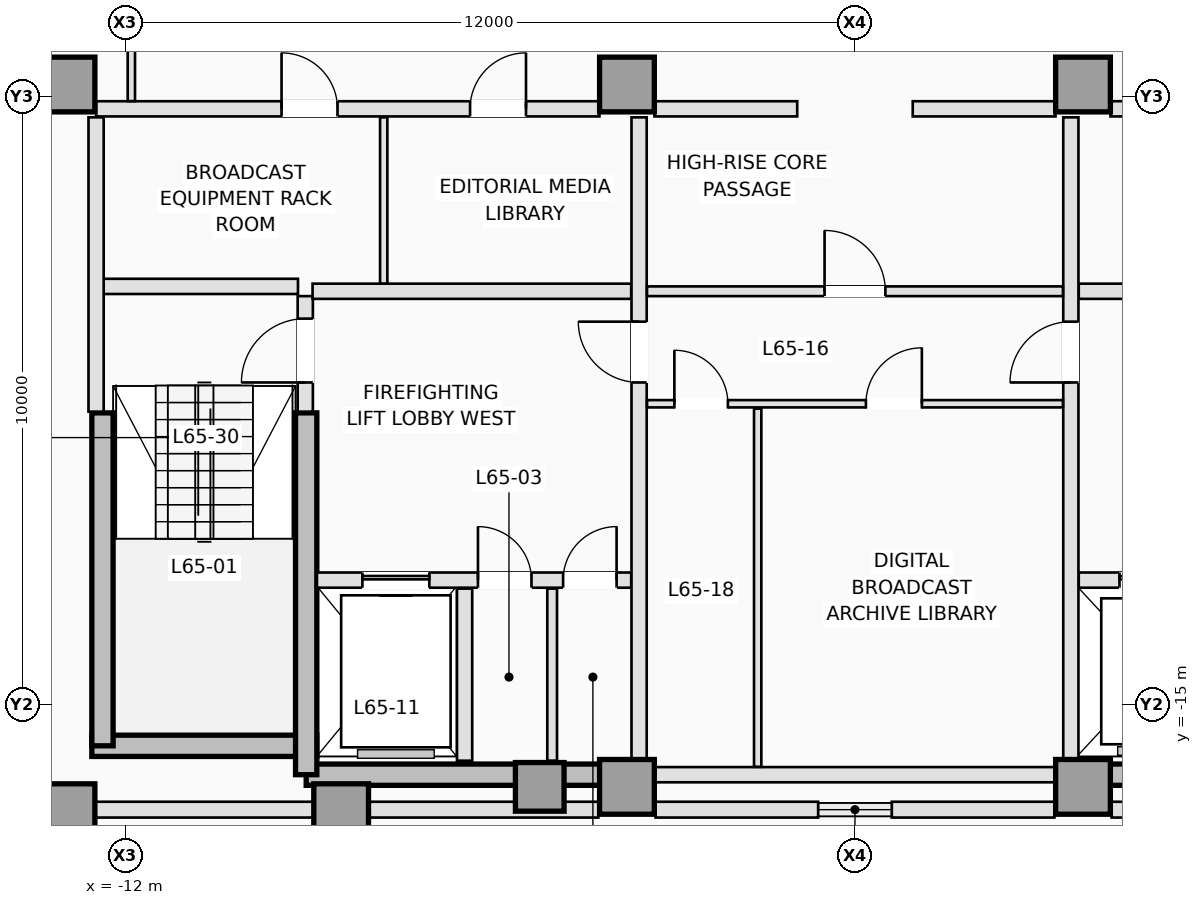
"""IFC4 building model, lengths in metres.
Left out: names, types, materials, properties, quantities, classifications, styles, units other than length and angle.
Written with IfcOpenShell. Run it as: python <this file> out.ifc"""

import sys

from ifc_helpers import new_model, si_unit, direction, frame, frame_2d, origin, origin_2d, place, context, subcontext, project, spatial, rectangle, extrude, element, fill, save


model = new_model("IFC4")
c1 = context("Model", 3, precision=1e-05, world=origin(), true_north=direction((0.0, 1.0)))
c2 = subcontext(c1, "Body", "Model", "MODEL_VIEW")
j1 = project(units=[si_unit("LENGTHUNIT", "METRE"), si_unit("PLANEANGLEUNIT", "RADIAN")], contexts=[c1])
p1 = place(None, origin())
s1 = spatial("IfcSite", under=j1, at=p1, CompositionType="ELEMENT")
p2 = place(p1, origin())
s2 = spatial("IfcBuilding", under=s1, at=p2, CompositionType="ELEMENT")
p3 = place(p2, frame((0.0, 0.0, 235.9)))
s3 = spatial("IfcBuildingStorey", under=s2, at=p3, CompositionType="ELEMENT", Elevation=235.9)
p4 = place(p3, frame((-12.55, -15.675, 0.0), z_axis=(0.0, 0.0, 1.0), x_axis=(1.0, 0.0, 0.0)))
e1 = element("IfcWall", 1, at=p4, inside=s3, PredefinedType="SHEAR", context=c2, shape_type="SweptSolid", body=[
    extrude(rectangle(XDim=3.7, YDim=0.35, at=frame_2d((1.85, 0.0))), origin(), (0.0, 0.0, 1.0), 3.5),
])
for number, where, z_axis, x_axis in (
    (2, (-9.025, -16.15, 0.0), (0.0, 0.0, 1.0), (1.0, 0.0, 0.0)),
    (3, (3.75, -16.15, 0.0), (0.0, 0.0, 1.0), (1.0, 0.0, 0.0)),
):
    element("IfcWall", number, at=place(p3, frame(where, z_axis=z_axis, x_axis=x_axis)), inside=s3, PredefinedType="SHEAR", context=c2, shape_type="SweptSolid", body=[
        extrude(rectangle(XDim=5.275, YDim=0.35, at=frame_2d((2.637, 0.0))), origin(), (0.0, 0.0, 1.0), 3.5),
    ])
p5 = place(p3, frame((-12.375, -15.675, 0.0), z_axis=(0.0, 0.0, 1.0), x_axis=(0.0, 1.0, 0.0)))
e4 = element("IfcWall", 4, at=p5, inside=s3, PredefinedType="SHEAR", context=c2, shape_type="SweptSolid", body=[
    extrude(rectangle(XDim=5.475, YDim=0.35, at=frame_2d((2.738, 0.0))), origin(), (0.0, 0.0, 1.0), 3.5),
])
p6 = place(p3, frame((-9.025, -16.15, 0.0), z_axis=(0.0, 0.0, 1.0), x_axis=(0.0, 1.0, 0.0)))
e5 = element("IfcWall", 5, at=p6, inside=s3, PredefinedType="SHEAR", context=c2, shape_type="SweptSolid", body=[
    extrude(rectangle(XDim=5.95, YDim=0.35, at=frame_2d((2.975, 0.0))), origin(), (0.0, 0.0, 1.0), 3.5),
])
for number, where, z_axis, x_axis in (
    (6, (-12.95, -16.75, 0.0), (0.0, 0.0, 1.0), (1.0, 0.0, 0.0)),
    (7, (-8.45, -16.75, 0.0), (0.0, 0.0, 1.0), (1.0, 0.0, 0.0)),
    (8, (-3.75, -16.35, 0.0), (0.0, 0.0, 1.0), (1.0, 0.0, 0.0)),
    (9, (3.75, -16.35, 0.0), (0.0, 0.0, 1.0), (1.0, 0.0, 0.0)),
    (10, (-12.95, -4.8, 0.0), (0.0, 0.0, 1.0), (1.0, 0.0, 0.0)),
    (11, (-3.75, -4.8, 0.0), (0.0, 0.0, 1.0), (1.0, 0.0, 0.0)),
    (12, (3.75, -4.8, 0.0), (0.0, 0.0, 1.0), (1.0, 0.0, 0.0)),
):
    element("IfcColumn", number, at=place(p3, frame(where, z_axis=z_axis, x_axis=x_axis)), inside=s3, PredefinedType="COLUMN", context=c2, shape_type="SweptSolid", body=[
        extrude(rectangle(XDim=0.9, YDim=0.9, at=origin_2d()), origin(), (0.0, 0.0, 1.0), 3.5),
    ])
p7 = place(p3, frame((-5.184, -16.35, 0.0), z_axis=(0.0, 0.0, 1.0), x_axis=(0.0, 1.0, 0.0)))
e13 = element("IfcColumn", 13, at=p7, inside=s3, PredefinedType="COLUMN", context=c2, shape_type="SweptSolid", body=[
    extrude(rectangle(XDim=0.8, YDim=0.8, at=origin_2d()), origin(), (0.0, 0.0, 1.0), 3.5),
])
for number, where, z_axis, x_axis in (
    (14, (15.493, -16.725, 0.0), (0.0, 0.0, 1.0), (-1.0, 0.0, 0.0)),
    (15, (-4.22, -16.725, 0.0), (0.0, 0.0, 1.0), (-1.0, 0.0, 0.0)),
):
    element("IfcWall", number, at=place(p3, frame(where, z_axis=z_axis, x_axis=x_axis)), inside=s3, PredefinedType="STANDARD", context=c2, shape_type="SweptSolid", body=[
        extrude(rectangle(XDim=11.273, YDim=0.26, at=frame_2d((5.636, 0.0))), origin(), (0.0, 0.0, 1.0), 2.79),
    ])
for number, where, z_axis, x_axis in (
    (16, (3.28, -16.725, 0.0), (0.0, 0.0, 1.0), (-1.0, 0.0, 0.0)),
    (17, (-0.606, -16.725, 0.0), (0.0, 0.0, 1.0), (-1.0, 0.0, 0.0)),
):
    element("IfcWall", number, at=place(p3, frame(where, z_axis=z_axis, x_axis=x_axis)), inside=s3, PredefinedType="STANDARD", context=c2, shape_type="SweptSolid", body=[
        extrude(rectangle(XDim=2.674, YDim=0.26, at=frame_2d((1.337, 0.0))), origin(), (0.0, 0.0, 1.0), 3.25),
    ])
p8 = place(p3, frame((-9.04, -10.18, 0.0), z_axis=(0.0, 0.0, 1.0), x_axis=(0.0, 1.0, 0.0)))
e18 = element("IfcWall", 18, at=p8, inside=s3, PredefinedType="PARTITIONING", context=c2, shape_type="SweptSolid", body=[
    extrude(rectangle(XDim=1.9, YDim=0.25, at=frame_2d((0.95, 0.0))), origin(), (0.0, 0.0, 1.0), 3.25),
])
p9 = place(p8, frame((0.48, 0.0, 0.0)))
e19 = element("IfcOpeningElement", 19, at=p9, cuts=e18, PredefinedType="OPENING", context=c2, shape_type="SweptSolid", body=[
    extrude(rectangle(XDim=1.05, YDim=2.15, at=frame_2d((0.525, 1.075))), frame((0.0, 0.135, 0.0), z_axis=(0.0, -1.0, 0.0), x_axis=(1.0, 0.0, 0.0)), (0.0, 0.0, 1.0), 0.27),
])
p10 = place(p3, frame((-12.38, -8.12, 0.0), z_axis=(0.0, 0.0, 1.0), x_axis=(1.0, 0.0, 0.0)))
e20 = element("IfcWall", 20, at=p10, inside=s3, PredefinedType="PARTITIONING", context=c2, shape_type="SweptSolid", body=[
    extrude(rectangle(XDim=3.22, YDim=0.25, at=frame_2d((1.61, 0.0))), origin(), (0.0, 0.0, 1.0), 3.25),
])
p11 = place(p3, frame((-12.48, -10.18, 0.0), z_axis=(0.0, 0.0, 1.0), x_axis=(0.0, 1.0, 0.0)))
e21 = element("IfcWall", 21, at=p11, inside=s3, PredefinedType="PARTITIONING", context=c2, shape_type="SweptSolid", body=[
    extrude(rectangle(XDim=4.84, YDim=0.25, at=frame_2d((2.42, 0.0))), origin(), (0.0, 0.0, 1.0), 3.25),
])
p12 = place(p3, frame((-8.848, -12.95, 0.0), z_axis=(0.0, 0.0, 1.0), x_axis=(1.0, 0.0, 0.0)))
e22 = element("IfcWall", 22, at=p12, inside=s3, PredefinedType="PARTITIONING", context=c2, shape_type="SweptSolid", body=[
    extrude(rectangle(XDim=5.168, YDim=0.25, at=frame_2d((2.584, 0.0))), origin(), (0.0, 0.0, 1.0), 3.25),
])
p13 = place(p12, frame((0.748, 0.0, 0.0)))
e23 = element("IfcOpeningElement", 23, at=p13, cuts=e22, PredefinedType="OPENING", context=c2, shape_type="SweptSolid", body=[
    extrude(rectangle(XDim=1.1, YDim=2.15, at=frame_2d((0.55, 1.075))), frame((0.0, 0.135, 0.0), z_axis=(0.0, -1.0, 0.0), x_axis=(1.0, 0.0, 0.0)), (0.0, 0.0, 1.0), 0.27),
])
p14 = place(p12, frame((2.648, 0.0, 0.0)))
e24 = element("IfcOpeningElement", 24, at=p14, cuts=e22, PredefinedType="OPENING", context=c2, shape_type="SweptSolid", body=[
    extrude(rectangle(XDim=0.88, YDim=2.1, at=frame_2d((0.44, 1.05))), frame((0.0, 0.135, 0.0), z_axis=(0.0, -1.0, 0.0), x_axis=(1.0, 0.0, 0.0)), (0.0, 0.0, 1.0), 0.27),
])
p15 = place(p12, frame((4.048, 0.0, 0.0)))
e25 = element("IfcOpeningElement", 25, at=p15, cuts=e22, PredefinedType="OPENING", context=c2, shape_type="SweptSolid", body=[
    extrude(rectangle(XDim=0.88, YDim=2.1, at=frame_2d((0.44, 1.05))), frame((0.0, 0.135, 0.0), z_axis=(0.0, -1.0, 0.0), x_axis=(1.0, 0.0, 0.0)), (0.0, 0.0, 1.0), 0.27),
])
p16 = place(p3, frame((3.68, -12.95, 0.0), z_axis=(0.0, 0.0, 1.0), x_axis=(1.0, 0.0, 0.0)))
e26 = element("IfcWall", 26, at=p16, inside=s3, PredefinedType="PARTITIONING", context=c2, shape_type="SweptSolid", body=[
    extrude(rectangle(XDim=5.168, YDim=0.25, at=frame_2d((2.584, 0.0))), origin(), (0.0, 0.0, 1.0), 3.25),
])
p17 = place(p16, frame((3.32, 0.0, 0.0)))
e27 = element("IfcOpeningElement", 27, at=p17, cuts=e26, PredefinedType="OPENING", context=c2, shape_type="SweptSolid", body=[
    extrude(rectangle(XDim=1.1, YDim=2.15, at=frame_2d((0.55, 1.075))), frame((0.0, 0.135, 0.0), z_axis=(0.0, -1.0, 0.0), x_axis=(1.0, 0.0, 0.0)), (0.0, 0.0, 1.0), 0.27),
])
p18 = place(p16, frame((0.67, 0.0, 0.0)))
e28 = element("IfcOpeningElement", 28, at=p18, cuts=e26, PredefinedType="OPENING", context=c2, shape_type="SweptSolid", body=[
    extrude(rectangle(XDim=1.2, YDim=2.15, at=frame_2d((0.6, 1.075))), frame((0.0, 0.135, 0.0), z_axis=(0.0, -1.0, 0.0), x_axis=(1.0, 0.0, 0.0)), (0.0, 0.0, 1.0), 0.27),
])
p19 = place(p3, frame((-6.42, -15.92, 0.0), z_axis=(0.0, 0.0, 1.0), x_axis=(0.0, 1.0, 0.0)))
e29 = element("IfcWall", 29, at=p19, inside=s3, PredefinedType="PARTITIONING", context=c2, shape_type="SweptSolid", body=[
    extrude(rectangle(XDim=2.83, YDim=0.25, at=frame_2d((1.415, 0.0))), origin(), (0.0, 0.0, 1.0), 3.25),
])
p20 = place(p3, frame((-4.98, -15.92, 0.0), z_axis=(0.0, 0.0, 1.0), x_axis=(0.0, 1.0, 0.0)))
e30 = element("IfcWall", 30, at=p20, inside=s3, PredefinedType="PARTITIONING", context=c2, shape_type="SweptSolid", body=[
    extrude(rectangle(XDim=2.83, YDim=0.16, at=frame_2d((1.415, 0.0))), origin(), (0.0, 0.0, 1.0), 3.25),
])
for number, where, z_axis, x_axis in (
    (31, (-8.92, -8.2, 0.0), (0.0, 0.0, 1.0), (1.0, 0.0, 0.0)),
    (32, (3.68, -8.2, 0.0), (0.0, 0.0, 1.0), (1.0, 0.0, 0.0)),
):
    element("IfcWall", number, at=place(p3, frame(where, z_axis=z_axis, x_axis=x_axis)), inside=s3, PredefinedType="PARTITIONING", context=c2, shape_type="SweptSolid", body=[
        extrude(rectangle(XDim=5.24, YDim=0.25, at=frame_2d((2.62, 0.0))), origin(), (0.0, 0.0, 1.0), 3.25),
    ])
p21 = place(p3, frame((-3.55, -15.898, 0.0), z_axis=(0.0, 0.0, 1.0), x_axis=(0.0, 1.0, 0.0)))
e33 = element("IfcWall", 33, at=p21, inside=s3, PredefinedType="PARTITIONING", context=c2, shape_type="SweptSolid", body=[
    extrude(rectangle(XDim=10.558, YDim=0.25, at=frame_2d((5.279, 0.0))), origin(), (0.0, 0.0, 1.0), 3.25),
])
p22 = place(p21, frame((6.198, 0.0, 0.0)))
e34 = element("IfcOpeningElement", 34, at=p22, cuts=e33, PredefinedType="OPENING", context=c2, shape_type="SweptSolid", body=[
    extrude(rectangle(XDim=1.0, YDim=2.15, at=frame_2d((0.5, 1.075))), frame((0.0, 0.135, 0.0), z_axis=(0.0, -1.0, 0.0), x_axis=(1.0, 0.0, 0.0)), (0.0, 0.0, 1.0), 0.27),
])
p23 = place(p3, frame((3.55, -15.898, 0.0), z_axis=(0.0, 0.0, 1.0), x_axis=(0.0, 1.0, 0.0)))
e35 = element("IfcWall", 35, at=p23, inside=s3, PredefinedType="PARTITIONING", context=c2, shape_type="SweptSolid", body=[
    extrude(rectangle(XDim=10.558, YDim=0.25, at=frame_2d((5.279, 0.0))), origin(), (0.0, 0.0, 1.0), 3.25),
])
p24 = place(p23, frame((6.198, 0.0, 0.0)))
e36 = element("IfcOpeningElement", 36, at=p24, cuts=e35, PredefinedType="OPENING", context=c2, shape_type="SweptSolid", body=[
    extrude(rectangle(XDim=1.0, YDim=2.15, at=frame_2d((0.5, 1.075))), frame((0.0, 0.135, 0.0), z_axis=(0.0, -1.0, 0.0), x_axis=(1.0, 0.0, 0.0)), (0.0, 0.0, 1.0), 0.27),
])
p25 = place(p3, frame((-12.48, -5.2, 0.0), z_axis=(0.0, 0.0, 1.0), x_axis=(1.0, 0.0, 0.0)))
e37 = element("IfcWall", 37, at=p25, inside=s3, PredefinedType="PARTITIONING", context=c2, shape_type="SweptSolid", body=[
    extrude(rectangle(XDim=8.278, YDim=0.25, at=frame_2d((4.139, 0.0))), origin(), (0.0, 0.0, 1.0), 3.25),
])
p26 = place(p25, frame((3.05, 0.0, 0.0)))
e38 = element("IfcOpeningElement", 38, at=p26, cuts=e37, PredefinedType="OPENING", context=c2, shape_type="SweptSolid", body=[
    extrude(rectangle(XDim=0.92, YDim=2.12, at=frame_2d((0.46, 1.06))), frame((0.0, 0.135, 0.0), z_axis=(0.0, -1.0, 0.0), x_axis=(1.0, 0.0, 0.0)), (0.0, 0.0, 1.0), 0.27),
])
p27 = place(p25, frame((6.15, 0.0, 0.0)))
e39 = element("IfcOpeningElement", 39, at=p27, cuts=e37, PredefinedType="OPENING", context=c2, shape_type="SweptSolid", body=[
    extrude(rectangle(XDim=0.92, YDim=2.12, at=frame_2d((0.46, 1.06))), frame((0.0, 0.135, 0.0), z_axis=(0.0, -1.0, 0.0), x_axis=(1.0, 0.0, 0.0)), (0.0, 0.0, 1.0), 0.27),
])
p28 = place(p3, frame((4.202, -5.2, 0.0), z_axis=(0.0, 0.0, 1.0), x_axis=(1.0, 0.0, 0.0)))
e40 = element("IfcWall", 40, at=p28, inside=s3, PredefinedType="PARTITIONING", context=c2, shape_type="SweptSolid", body=[
    extrude(rectangle(XDim=8.278, YDim=0.25, at=frame_2d((4.139, 0.0))), origin(), (0.0, 0.0, 1.0), 3.25),
])
p29 = place(p28, frame((0.748, 0.0, 0.0)))
e41 = element("IfcOpeningElement", 41, at=p29, cuts=e40, PredefinedType="OPENING", context=c2, shape_type="SweptSolid", body=[
    extrude(rectangle(XDim=1.0, YDim=2.15, at=frame_2d((0.5, 1.075))), frame((0.0, 0.135, 0.0), z_axis=(0.0, -1.0, 0.0), x_axis=(1.0, 0.0, 0.0)), (0.0, 0.0, 1.0), 0.27),
])
p30 = place(p28, frame((2.698, 0.0, 0.0)))
e42 = element("IfcOpeningElement", 42, at=p30, cuts=e40, PredefinedType="OPENING", context=c2, shape_type="SweptSolid", body=[
    extrude(rectangle(XDim=1.0, YDim=2.15, at=frame_2d((0.5, 1.075))), frame((0.0, 0.135, 0.0), z_axis=(0.0, -1.0, 0.0), x_axis=(1.0, 0.0, 0.0)), (0.0, 0.0, 1.0), 0.27),
])
p31 = place(p28, frame((4.648, 0.0, 0.0)))
e43 = element("IfcOpeningElement", 43, at=p31, cuts=e40, PredefinedType="OPENING", context=c2, shape_type="SweptSolid", body=[
    extrude(rectangle(XDim=1.0, YDim=2.15, at=frame_2d((0.5, 1.075))), frame((0.0, 0.135, 0.0), z_axis=(0.0, -1.0, 0.0), x_axis=(1.0, 0.0, 0.0)), (0.0, 0.0, 1.0), 0.27),
])
p32 = place(p28, frame((6.598, 0.0, 0.0)))
e44 = element("IfcOpeningElement", 44, at=p32, cuts=e40, PredefinedType="OPENING", context=c2, shape_type="SweptSolid", body=[
    extrude(rectangle(XDim=1.0, YDim=2.15, at=frame_2d((0.5, 1.075))), frame((0.0, 0.135, 0.0), z_axis=(0.0, -1.0, 0.0), x_axis=(1.0, 0.0, 0.0)), (0.0, 0.0, 1.0), 0.27),
])
for number, where, z_axis, x_axis in (
    (45, (-3.298, -5.2, 0.0), (0.0, 0.0, 1.0), (1.0, 0.0, 0.0)),
    (46, (0.95, -5.2, 0.0), (0.0, 0.0, 1.0), (1.0, 0.0, 0.0)),
):
    element("IfcWall", number, at=place(p3, frame(where, z_axis=z_axis, x_axis=x_axis)), inside=s3, PredefinedType="PARTITIONING", context=c2, shape_type="SweptSolid", body=[
        extrude(rectangle(XDim=2.348, YDim=0.25, at=frame_2d((1.174, 0.0))), origin(), (0.0, 0.0, 1.0), 3.25),
    ])
p33 = place(p3, frame((-7.75, -8.073, 0.0), z_axis=(0.0, 0.0, 1.0), x_axis=(0.0, 1.0, 0.0)))
e47 = element("IfcWall", 47, at=p33, inside=s3, PredefinedType="PARTITIONING", context=c2, shape_type="SweptSolid", body=[
    extrude(rectangle(XDim=2.733, YDim=0.12, at=frame_2d((1.366, 0.0))), origin(), (0.0, 0.0, 1.0), 3.25),
])
p34 = place(p3, frame((-3.298, -16.15, 0.0), z_axis=(0.0, 0.0, 1.0), x_axis=(1.0, 0.0, 0.0)))
e48 = element("IfcWall", 48, at=p34, inside=s3, PredefinedType="PARTITIONING", context=c2, shape_type="SweptSolid", body=[
    extrude(rectangle(XDim=6.596, YDim=0.25, at=frame_2d((3.298, 0.0))), origin(), (0.0, 0.0, 1.0), 2.844),
])
p35 = place(p3, frame((-3.42, -8.2, 0.0), z_axis=(0.0, 0.0, 1.0), x_axis=(1.0, 0.0, 0.0)))
e49 = element("IfcWall", 49, at=p35, inside=s3, PredefinedType="PARTITIONING", context=c2, shape_type="SweptSolid", body=[
    extrude(rectangle(XDim=6.84, YDim=0.16, at=frame_2d((3.42, 0.0))), origin(), (0.0, 0.0, 1.0), 3.25),
])
p36 = place(p35, frame((2.92, 0.0, 0.0)))
e50 = element("IfcOpeningElement", 50, at=p36, cuts=e49, PredefinedType="OPENING", context=c2, shape_type="SweptSolid", body=[
    extrude(rectangle(XDim=1.0, YDim=2.15, at=frame_2d((0.5, 1.075))), frame((0.0, 0.09, 0.0), z_axis=(0.0, -1.0, 0.0), x_axis=(1.0, 0.0, 0.0)), (0.0, 0.0, 1.0), 0.18),
])
p37 = place(p3, frame((-3.42, -10.05, 0.0), z_axis=(0.0, 0.0, 1.0), x_axis=(1.0, 0.0, 0.0)))
e51 = element("IfcWall", 51, at=p37, inside=s3, PredefinedType="PARTITIONING", context=c2, shape_type="SweptSolid", body=[
    extrude(rectangle(XDim=6.84, YDim=0.12, at=frame_2d((3.42, 0.0))), origin(), (0.0, 0.0, 1.0), 3.25),
])
p38 = place(p37, frame((0.45, 0.0, 0.0)))
e52 = element("IfcOpeningElement", 52, at=p38, cuts=e51, PredefinedType="OPENING", context=c2, shape_type="SweptSolid", body=[
    extrude(rectangle(XDim=0.88, YDim=2.12, at=frame_2d((0.44, 1.06))), frame((0.0, 0.07, 0.0), z_axis=(0.0, -1.0, 0.0), x_axis=(1.0, 0.0, 0.0)), (0.0, 0.0, 1.0), 0.14),
])
p39 = place(p37, frame((3.6, 0.0, 0.0)))
e53 = element("IfcOpeningElement", 53, at=p39, cuts=e51, PredefinedType="OPENING", context=c2, shape_type="SweptSolid", body=[
    extrude(rectangle(XDim=0.92, YDim=2.12, at=frame_2d((0.46, 1.06))), frame((0.0, 0.07, 0.0), z_axis=(0.0, -1.0, 0.0), x_axis=(1.0, 0.0, 0.0)), (0.0, 0.0, 1.0), 0.14),
])
p40 = place(p3, frame((-1.6, -16.02, 0.0), z_axis=(0.0, 0.0, 1.0), x_axis=(0.0, 1.0, 0.0)))
e54 = element("IfcWall", 54, at=p40, inside=s3, PredefinedType="PARTITIONING", context=c2, shape_type="SweptSolid", body=[
    extrude(rectangle(XDim=5.89, YDim=0.12, at=frame_2d((2.945, 0.0))), origin(), (0.0, 0.0, 1.0), 3.25),
])
p41 = place(p3, frame((-11.9, -5.073, 0.0), z_axis=(0.0, 0.0, 1.0), x_axis=(0.0, 1.0, 0.0)))
e55 = element("IfcWall", 55, at=p41, inside=s3, PredefinedType="PARTITIONING", context=c2, shape_type="SweptSolid", body=[
    extrude(rectangle(XDim=2.343, YDim=0.12, at=frame_2d((1.171, 0.0))), origin(), (0.0, 0.0, 1.0), 3.25),
])
p42 = place(p13, origin())
e56 = element("IfcDoor", 56, at=p42, inside=s3, OperationType="SLIDING_TO_LEFT", PredefinedType="DOOR", context=c2, shape_type="SweptSolid", body=[
    extrude(rectangle(XDim=1.1, YDim=2.15, at=frame_2d((0.55, 1.075))), frame((0.0, 0.025, 0.0), z_axis=(0.0, -1.0, 0.0), x_axis=(1.0, 0.0, 0.0)), (0.0, 0.0, 1.0), 0.05),
])
fill(e23, e56)
p43 = place(p18, origin())
e57 = element("IfcDoor", 57, at=p43, inside=s3, OperationType="SLIDING_TO_LEFT", PredefinedType="DOOR", context=c2, shape_type="SweptSolid", body=[
    extrude(rectangle(XDim=1.2, YDim=2.15, at=frame_2d((0.6, 1.075))), frame((0.0, 0.025, 0.0), z_axis=(0.0, -1.0, 0.0), x_axis=(1.0, 0.0, 0.0)), (0.0, 0.0, 1.0), 0.05),
])
fill(e28, e57)
p44 = place(p9, origin())
e58 = element("IfcDoor", 58, at=p44, inside=s3, OperationType="SINGLE_SWING_LEFT", PredefinedType="DOOR", context=c2, shape_type="SweptSolid", body=[
    extrude(rectangle(XDim=1.05, YDim=2.15, at=frame_2d((0.525, 1.075))), frame((0.0, 0.025, 0.0), z_axis=(0.0, -1.0, 0.0), x_axis=(1.0, 0.0, 0.0)), (0.0, 0.0, 1.0), 0.05),
])
fill(e19, e58)
p45 = place(p14, origin())
e59 = element("IfcDoor", 59, at=p45, inside=s3, OperationType="SINGLE_SWING_LEFT", PredefinedType="TRAPDOOR", context=c2, shape_type="SweptSolid", body=[
    extrude(rectangle(XDim=0.88, YDim=2.1, at=frame_2d((0.44, 1.05))), frame((0.0, 0.025, 0.0), z_axis=(0.0, -1.0, 0.0), x_axis=(1.0, 0.0, 0.0)), (0.0, 0.0, 1.0), 0.05),
])
fill(e24, e59)
p46 = place(p15, origin())
e60 = element("IfcDoor", 60, at=p46, inside=s3, OperationType="SINGLE_SWING_RIGHT", PredefinedType="TRAPDOOR", context=c2, shape_type="SweptSolid", body=[
    extrude(rectangle(XDim=0.88, YDim=2.1, at=frame_2d((0.44, 1.05))), frame((0.0, 0.025, 0.0), z_axis=(0.0, -1.0, 0.0), x_axis=(1.0, 0.0, 0.0)), (0.0, 0.0, 1.0), 0.05),
])
fill(e25, e60)
p47 = place(p22, origin())
e61 = element("IfcDoor", 61, at=p47, inside=s3, OperationType="SINGLE_SWING_RIGHT", PredefinedType="DOOR", context=c2, shape_type="SweptSolid", body=[
    extrude(rectangle(XDim=1.0, YDim=2.15, at=frame_2d((0.5, 1.075))), frame((0.0, 0.025, 0.0), z_axis=(0.0, -1.0, 0.0), x_axis=(1.0, 0.0, 0.0)), (0.0, 0.0, 1.0), 0.05),
])
fill(e34, e61)
p48 = place(p24, origin())
e62 = element("IfcDoor", 62, at=p48, inside=s3, OperationType="SINGLE_SWING_LEFT", PredefinedType="DOOR", context=c2, shape_type="SweptSolid", body=[
    extrude(rectangle(XDim=1.0, YDim=2.15, at=frame_2d((0.5, 1.075))), frame((0.0, 0.025, 0.0), z_axis=(0.0, -1.0, 0.0), x_axis=(1.0, 0.0, 0.0)), (0.0, 0.0, 1.0), 0.05),
])
fill(e36, e62)
p49 = place(p26, origin())
e63 = element("IfcDoor", 63, at=p49, inside=s3, OperationType="SINGLE_SWING_LEFT", PredefinedType="DOOR", context=c2, shape_type="SweptSolid", body=[
    extrude(rectangle(XDim=0.92, YDim=2.12, at=frame_2d((0.46, 1.06))), frame((0.0, 0.025, 0.0), z_axis=(0.0, -1.0, 0.0), x_axis=(1.0, 0.0, 0.0)), (0.0, 0.0, 1.0), 0.05),
])
fill(e38, e63)
p50 = place(p27, origin())
e64 = element("IfcDoor", 64, at=p50, inside=s3, OperationType="SINGLE_SWING_RIGHT", PredefinedType="DOOR", context=c2, shape_type="SweptSolid", body=[
    extrude(rectangle(XDim=0.92, YDim=2.12, at=frame_2d((0.46, 1.06))), frame((0.0, 0.025, 0.0), z_axis=(0.0, -1.0, 0.0), x_axis=(1.0, 0.0, 0.0)), (0.0, 0.0, 1.0), 0.05),
])
fill(e39, e64)
p51 = place(p36, origin())
e65 = element("IfcDoor", 65, at=p51, inside=s3, OperationType="SINGLE_SWING_LEFT", PredefinedType="DOOR", context=c2, shape_type="SweptSolid", body=[
    extrude(rectangle(XDim=1.0, YDim=2.15, at=frame_2d((0.5, 1.075))), frame((0.0, 0.025, 0.0), z_axis=(0.0, -1.0, 0.0), x_axis=(1.0, 0.0, 0.0)), (0.0, 0.0, 1.0), 0.05),
])
fill(e50, e65)
p52 = place(p38, origin())
e66 = element("IfcDoor", 66, at=p52, inside=s3, OperationType="SINGLE_SWING_LEFT", PredefinedType="DOOR", context=c2, shape_type="SweptSolid", body=[
    extrude(rectangle(XDim=0.88, YDim=2.12, at=frame_2d((0.44, 1.06))), frame((0.0, 0.025, 0.0), z_axis=(0.0, -1.0, 0.0), x_axis=(1.0, 0.0, 0.0)), (0.0, 0.0, 1.0), 0.05),
])
fill(e52, e66)
p53 = place(p39, origin())
e67 = element("IfcDoor", 67, at=p53, inside=s3, OperationType="SINGLE_SWING_RIGHT", PredefinedType="DOOR", context=c2, shape_type="SweptSolid", body=[
    extrude(rectangle(XDim=0.92, YDim=2.12, at=frame_2d((0.46, 1.06))), frame((0.0, 0.025, 0.0), z_axis=(0.0, -1.0, 0.0), x_axis=(1.0, 0.0, 0.0)), (0.0, 0.0, 1.0), 0.05),
])
fill(e53, e67)
save(model, sys.argv[1])
